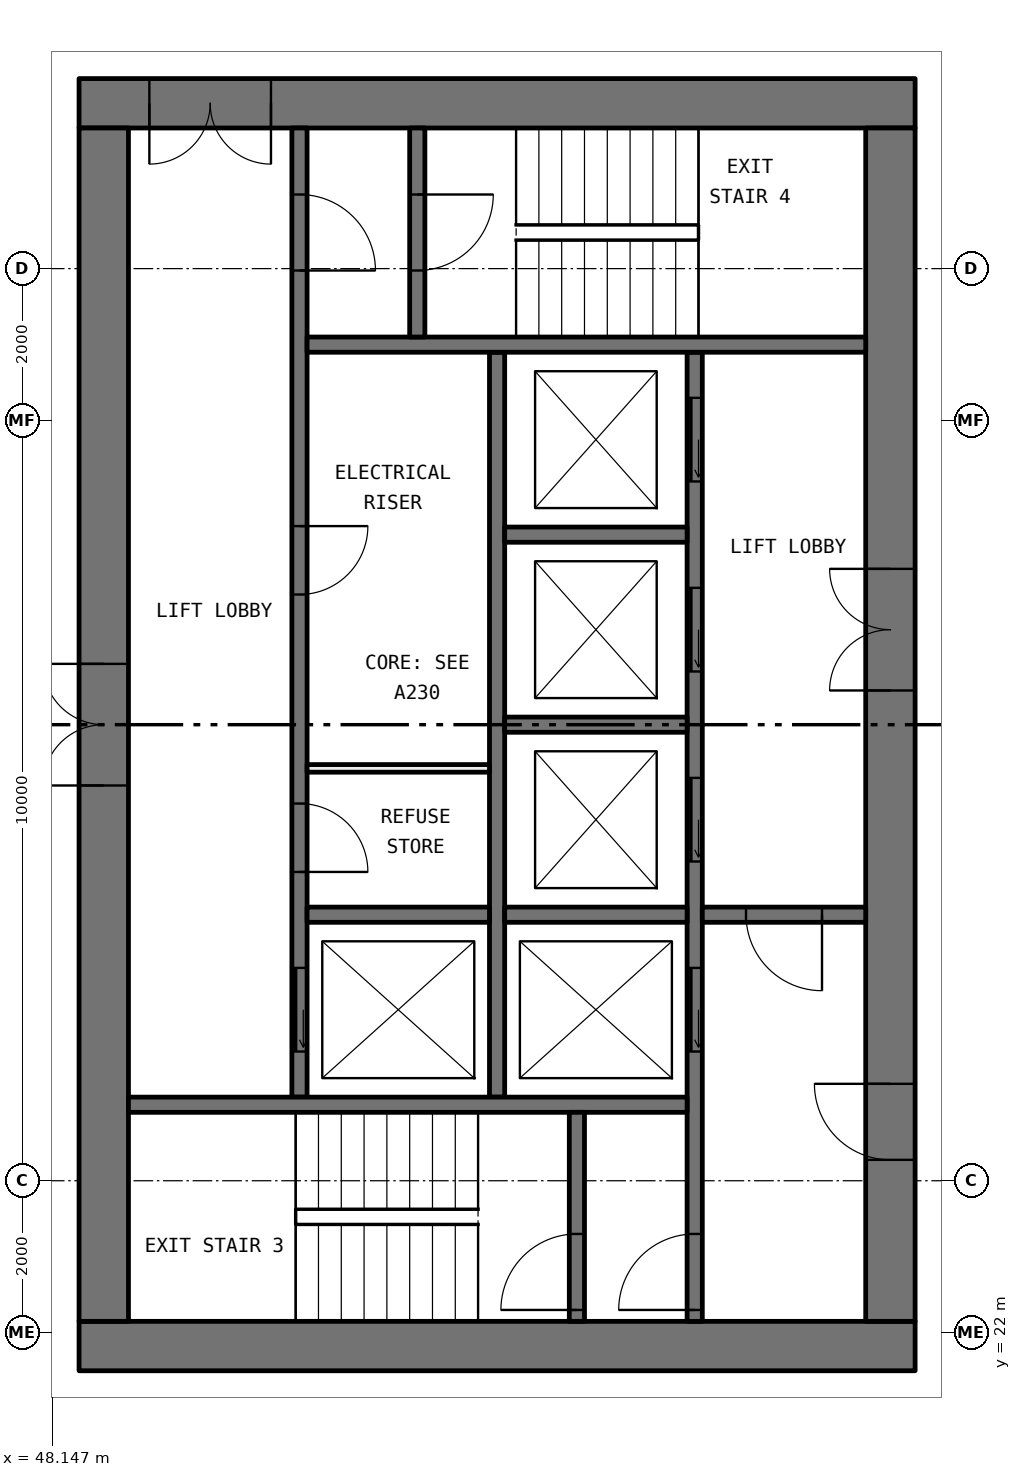
"""IFC4 building model, lengths in metres.
Left out: names, types, materials, properties, quantities, classifications, styles, units other than length and angle.
Written with IfcOpenShell. Run it as: python <this file> out.ifc"""

import sys

from ifc_helpers import new_model, si_unit, direction, frame, frame_2d, origin, place, context, subcontext, project, spatial, rectangle, extrude, element, fill, save


model = new_model("IFC4")
c1 = context("Model", 3, precision=1e-05, world=origin(), true_north=direction((0.0, 1.0)))
c2 = subcontext(c1, "Body", "Model", "MODEL_VIEW")
j1 = project(units=[si_unit("LENGTHUNIT", "METRE"), si_unit("PLANEANGLEUNIT", "RADIAN")], contexts=[c1])
p1 = place(None, origin())
s1 = spatial("IfcSite", under=j1, at=p1, CompositionType="ELEMENT")
p2 = place(p1, origin())
s2 = spatial("IfcBuilding", under=s1, at=p2, CompositionType="ELEMENT")
p3 = place(p2, frame((0.0, 0.0, 113.85)))
s3 = spatial("IfcBuildingStorey", under=s2, at=p3, CompositionType="ELEMENT", Elevation=113.85)
p4 = place(p3, frame((59.5, 21.825, 0.0), z_axis=(0.0, 0.0, 1.0), x_axis=(-1.0, 0.0, 0.0)))
e1 = element("IfcWall", 1, at=p4, inside=s3, PredefinedType="SHEAR", context=c2, shape_type="SweptSolid", body=[
    extrude(rectangle(XDim=11.0, YDim=0.65, at=frame_2d((5.5, 0.0))), origin(), (0.0, 0.0, 1.0), 3.05),
])
p5 = place(p3, frame((59.5, 38.175, 0.0), z_axis=(0.0, 0.0, 1.0), x_axis=(-1.0, 0.0, 0.0)))
e2 = element("IfcWall", 2, at=p5, inside=s3, PredefinedType="SHEAR", context=c2, shape_type="SweptSolid", body=[
    extrude(rectangle(XDim=11.0, YDim=0.65, at=frame_2d((5.5, 0.0))), origin(), (0.0, 0.0, 1.0), 3.05),
])
p6 = place(p5, frame((8.475, 0.0, 0.0)))
e3 = element("IfcOpeningElement", 3, at=p6, cuts=e2, PredefinedType="OPENING", context=c2, shape_type="SweptSolid", body=[
    extrude(rectangle(XDim=1.6, YDim=2.1, at=frame_2d((0.8, 1.05))), frame((0.0, 0.335, 0.0), z_axis=(0.0, -1.0, 0.0), x_axis=(1.0, 0.0, 0.0)), (0.0, 0.0, 1.0), 0.67),
])
p7 = place(p3, frame((59.175, 22.15, 0.0), z_axis=(0.0, 0.0, 1.0), x_axis=(0.0, 1.0, 0.0)))
e4 = element("IfcWall", 4, at=p7, inside=s3, PredefinedType="SHEAR", context=c2, shape_type="SweptSolid", body=[
    extrude(rectangle(XDim=15.7, YDim=0.65, at=frame_2d((7.85, 0.0))), origin(), (0.0, 0.0, 1.0), 3.05),
])
p8 = place(p7, frame((8.3, 0.0, 0.0)))
e5 = element("IfcOpeningElement", 5, at=p8, cuts=e4, PredefinedType="OPENING", context=c2, shape_type="SweptSolid", body=[
    extrude(rectangle(XDim=1.6, YDim=2.1, at=frame_2d((0.8, 1.05))), frame((0.0, 0.335, 0.0), z_axis=(0.0, -1.0, 0.0), x_axis=(1.0, 0.0, 0.0)), (0.0, 0.0, 1.0), 0.67),
])
p9 = place(p7, frame((2.125, 0.0, 0.0)))
e6 = element("IfcOpeningElement", 6, at=p9, cuts=e4, PredefinedType="OPENING", context=c2, shape_type="SweptSolid", body=[
    extrude(rectangle(XDim=1.0, YDim=2.1, at=frame_2d((0.5, 1.05))), frame((0.0, 0.335, 0.0), z_axis=(0.0, -1.0, 0.0), x_axis=(1.0, 0.0, 0.0)), (0.0, 0.0, 1.0), 0.67),
])
p10 = place(p3, frame((48.825, 22.15, 0.0), z_axis=(0.0, 0.0, 1.0), x_axis=(0.0, 1.0, 0.0)))
e7 = element("IfcWall", 7, at=p10, inside=s3, PredefinedType="SHEAR", context=c2, shape_type="SweptSolid", body=[
    extrude(rectangle(XDim=15.7, YDim=0.65, at=frame_2d((7.85, 0.0))), origin(), (0.0, 0.0, 1.0), 3.05),
])
p11 = place(p10, frame((7.05, 0.0, 0.0)))
e8 = element("IfcOpeningElement", 8, at=p11, cuts=e7, PredefinedType="OPENING", context=c2, shape_type="SweptSolid", body=[
    extrude(rectangle(XDim=1.6, YDim=2.1, at=frame_2d((0.8, 1.05))), frame((0.0, 0.335, 0.0), z_axis=(0.0, -1.0, 0.0), x_axis=(1.0, 0.0, 0.0)), (0.0, 0.0, 1.0), 0.67),
])
p12 = place(p3, frame((56.6, 22.15, 0.0), z_axis=(0.0, 0.0, 1.0), x_axis=(0.0, 1.0, 0.0)))
e9 = element("IfcWall", 9, at=p12, inside=s3, PredefinedType="SOLIDWALL", context=c2, shape_type="SweptSolid", body=[
    extrude(rectangle(XDim=12.75, YDim=0.2, at=frame_2d((6.375, 0.0))), origin(), (0.0, 0.0, 1.0), 3.05),
])
p13 = place(p12, frame((3.55, 0.0, 0.0)))
e10 = element("IfcOpeningElement", 10, at=p13, cuts=e9, PredefinedType="OPENING", context=c2, shape_type="SweptSolid", body=[
    extrude(rectangle(XDim=1.1, YDim=2.1, at=frame_2d((0.55, 1.05))), frame((0.0, 0.11, 0.0), z_axis=(0.0, -1.0, 0.0), x_axis=(1.0, 0.0, 0.0)), (0.0, 0.0, 1.0), 0.22),
])
p14 = place(p12, frame((6.05, 0.0, 0.0)))
e11 = element("IfcOpeningElement", 11, at=p14, cuts=e9, PredefinedType="OPENING", context=c2, shape_type="SweptSolid", body=[
    extrude(rectangle(XDim=1.1, YDim=2.1, at=frame_2d((0.55, 1.05))), frame((0.0, 0.11, 0.0), z_axis=(0.0, -1.0, 0.0), x_axis=(1.0, 0.0, 0.0)), (0.0, 0.0, 1.0), 0.22),
])
p15 = place(p12, frame((8.55, 0.0, 0.0)))
e12 = element("IfcOpeningElement", 12, at=p15, cuts=e9, PredefinedType="OPENING", context=c2, shape_type="SweptSolid", body=[
    extrude(rectangle(XDim=1.1, YDim=2.1, at=frame_2d((0.55, 1.05))), frame((0.0, 0.11, 0.0), z_axis=(0.0, -1.0, 0.0), x_axis=(1.0, 0.0, 0.0)), (0.0, 0.0, 1.0), 0.22),
])
p16 = place(p12, frame((11.05, 0.0, 0.0)))
e13 = element("IfcOpeningElement", 13, at=p16, cuts=e9, PredefinedType="OPENING", context=c2, shape_type="SweptSolid", body=[
    extrude(rectangle(XDim=1.1, YDim=2.1, at=frame_2d((0.55, 1.05))), frame((0.0, 0.11, 0.0), z_axis=(0.0, -1.0, 0.0), x_axis=(1.0, 0.0, 0.0)), (0.0, 0.0, 1.0), 0.22),
])
p17 = place(p12, frame((0.15, 0.0, 0.0)))
e14 = element("IfcOpeningElement", 14, at=p17, cuts=e9, PredefinedType="OPENING", context=c2, shape_type="SweptSolid", body=[
    extrude(rectangle(XDim=1.0, YDim=2.1, at=frame_2d((0.5, 1.05))), frame((0.0, 0.11, 0.0), z_axis=(0.0, -1.0, 0.0), x_axis=(1.0, 0.0, 0.0)), (0.0, 0.0, 1.0), 0.22),
])
p18 = place(p3, frame((51.4, 25.1, 0.0), z_axis=(0.0, 0.0, 1.0), x_axis=(0.0, 1.0, 0.0)))
e15 = element("IfcWall", 15, at=p18, inside=s3, PredefinedType="SOLIDWALL", context=c2, shape_type="SweptSolid", body=[
    extrude(rectangle(XDim=12.75, YDim=0.2, at=frame_2d((6.375, 0.0))), origin(), (0.0, 0.0, 1.0), 3.05),
])
p19 = place(p18, frame((0.6, 0.0, 0.0)))
e16 = element("IfcOpeningElement", 16, at=p19, cuts=e15, PredefinedType="OPENING", context=c2, shape_type="SweptSolid", body=[
    extrude(rectangle(XDim=1.1, YDim=2.1, at=frame_2d((0.55, 1.05))), frame((0.0, 0.11, 0.0), z_axis=(0.0, -1.0, 0.0), x_axis=(1.0, 0.0, 0.0)), (0.0, 0.0, 1.0), 0.22),
])
p20 = place(p18, frame((10.875, 0.0, 0.0)))
e17 = element("IfcOpeningElement", 17, at=p20, cuts=e15, PredefinedType="OPENING", context=c2, shape_type="SweptSolid", body=[
    extrude(rectangle(XDim=1.0, YDim=2.1, at=frame_2d((0.5, 1.05))), frame((0.0, 0.11, 0.0), z_axis=(0.0, -1.0, 0.0), x_axis=(1.0, 0.0, 0.0)), (0.0, 0.0, 1.0), 0.22),
])
p21 = place(p18, frame((2.962, 0.0, 0.0)))
e18 = element("IfcOpeningElement", 18, at=p21, cuts=e15, PredefinedType="OPENING", context=c2, shape_type="SweptSolid", body=[
    extrude(rectangle(XDim=0.9, YDim=2.1, at=frame_2d((0.45, 1.05))), frame((0.0, 0.11, 0.0), z_axis=(0.0, -1.0, 0.0), x_axis=(1.0, 0.0, 0.0)), (0.0, 0.0, 1.0), 0.22),
])
p22 = place(p18, frame((6.613, 0.0, 0.0)))
e19 = element("IfcOpeningElement", 19, at=p22, cuts=e15, PredefinedType="OPENING", context=c2, shape_type="SweptSolid", body=[
    extrude(rectangle(XDim=0.9, YDim=2.1, at=frame_2d((0.45, 1.05))), frame((0.0, 0.11, 0.0), z_axis=(0.0, -1.0, 0.0), x_axis=(1.0, 0.0, 0.0)), (0.0, 0.0, 1.0), 0.22),
])
p23 = place(p3, frame((54.0, 25.1, 0.0), z_axis=(0.0, 0.0, 1.0), x_axis=(0.0, 1.0, 0.0)))
e20 = element("IfcWall", 20, at=p23, inside=s3, PredefinedType="SOLIDWALL", context=c2, shape_type="SweptSolid", body=[
    extrude(rectangle(XDim=9.8, YDim=0.2, at=frame_2d((4.9, 0.0))), origin(), (0.0, 0.0, 1.0), 3.05),
])
for number, where, z_axis, x_axis in (
    (21, (56.5, 25.0, 0.0), (0.0, 0.0, 1.0), (-1.0, 0.0, 0.0)),
    (22, (58.85, 35.0, 0.0), (0.0, 0.0, 1.0), (-1.0, 0.0, 0.0)),
):
    element("IfcWall", number, at=place(p3, frame(where, z_axis=z_axis, x_axis=x_axis)), inside=s3, PredefinedType="SOLIDWALL", context=c2, shape_type="SweptSolid", body=[
        extrude(rectangle(XDim=7.35, YDim=0.2, at=frame_2d((3.675, 0.0))), origin(), (0.0, 0.0, 1.0), 3.05),
    ])
p24 = place(p3, frame((58.85, 27.5, 0.0), z_axis=(0.0, 0.0, 1.0), x_axis=(-1.0, 0.0, 0.0)))
e23 = element("IfcWall", 23, at=p24, inside=s3, PredefinedType="SOLIDWALL", context=c2, shape_type="SweptSolid", body=[
    extrude(rectangle(XDim=2.15, YDim=0.2, at=frame_2d((1.075, 0.0))), origin(), (0.0, 0.0, 1.0), 3.05),
])
p25 = place(p24, frame((0.575, 0.0, 0.0)))
e24 = element("IfcOpeningElement", 24, at=p25, cuts=e23, PredefinedType="OPENING", context=c2, shape_type="SweptSolid", body=[
    extrude(rectangle(XDim=1.0, YDim=2.1, at=frame_2d((0.5, 1.05))), frame((0.0, 0.11, 0.0), z_axis=(0.0, -1.0, 0.0), x_axis=(1.0, 0.0, 0.0)), (0.0, 0.0, 1.0), 0.22),
])
p26 = place(p3, frame((55.05, 22.15, 0.0), z_axis=(0.0, 0.0, 1.0), x_axis=(0.0, 1.0, 0.0)))
e25 = element("IfcWall", 25, at=p26, inside=s3, PredefinedType="SOLIDWALL", context=c2, shape_type="SweptSolid", body=[
    extrude(rectangle(XDim=2.75, YDim=0.2, at=frame_2d((1.375, 0.0))), origin(), (0.0, 0.0, 1.0), 3.05),
])
p27 = place(p26, frame((0.15, 0.0, 0.0)))
e26 = element("IfcOpeningElement", 26, at=p27, cuts=e25, PredefinedType="OPENING", context=c2, shape_type="SweptSolid", body=[
    extrude(rectangle(XDim=1.0, YDim=2.1, at=frame_2d((0.5, 1.05))), frame((0.0, 0.11, 0.0), z_axis=(0.0, -1.0, 0.0), x_axis=(1.0, 0.0, 0.0)), (0.0, 0.0, 1.0), 0.22),
])
p28 = place(p3, frame((52.95, 35.1, 0.0), z_axis=(0.0, 0.0, 1.0), x_axis=(0.0, 1.0, 0.0)))
e27 = element("IfcWall", 27, at=p28, inside=s3, PredefinedType="SOLIDWALL", context=c2, shape_type="SweptSolid", body=[
    extrude(rectangle(XDim=2.75, YDim=0.2, at=frame_2d((1.375, 0.0))), origin(), (0.0, 0.0, 1.0), 3.05),
])
p29 = place(p28, frame((0.875, 0.0, 0.0)))
e28 = element("IfcOpeningElement", 28, at=p29, cuts=e27, PredefinedType="OPENING", context=c2, shape_type="SweptSolid", body=[
    extrude(rectangle(XDim=1.0, YDim=2.1, at=frame_2d((0.5, 1.05))), frame((0.0, 0.11, 0.0), z_axis=(0.0, -1.0, 0.0), x_axis=(1.0, 0.0, 0.0)), (0.0, 0.0, 1.0), 0.22),
])
for number, where, z_axis, x_axis in (
    (29, (56.5, 27.5, 0.0), (0.0, 0.0, 1.0), (-1.0, 0.0, 0.0)),
    (30, (56.5, 30.0, 0.0), (0.0, 0.0, 1.0), (-1.0, 0.0, 0.0)),
    (31, (56.5, 32.5, 0.0), (0.0, 0.0, 1.0), (-1.0, 0.0, 0.0)),
    (32, (53.9, 27.5, 0.0), (0.0, 0.0, 1.0), (-1.0, 0.0, 0.0)),
):
    element("IfcWall", number, at=place(p3, frame(where, z_axis=z_axis, x_axis=x_axis)), inside=s3, PredefinedType="SOLIDWALL", context=c2, shape_type="SweptSolid", body=[
        extrude(rectangle(XDim=2.4, YDim=0.2, at=frame_2d((1.2, 0.0))), origin(), (0.0, 0.0, 1.0), 3.05),
    ])
p30 = place(p3, frame((53.9, 29.425, 0.0), z_axis=(0.0, 0.0, 1.0), x_axis=(-1.0, 0.0, 0.0)))
e33 = element("IfcWall", 33, at=p30, inside=s3, PredefinedType="PARTITIONING", context=c2, shape_type="SweptSolid", body=[
    extrude(rectangle(XDim=2.4, YDim=0.1, at=frame_2d((1.2, 0.0))), origin(), (0.0, 0.0, 1.0), 3.05),
])
p31 = place(p19, origin())
e34 = element("IfcDoor", 34, at=p31, inside=s3, OperationType="SLIDING_TO_LEFT", PredefinedType="DOOR", context=c2, shape_type="SweptSolid", body=[
    extrude(rectangle(XDim=1.1, YDim=2.1, at=frame_2d((0.55, 1.05))), frame((0.0, 0.025, 0.0), z_axis=(0.0, -1.0, 0.0), x_axis=(1.0, 0.0, 0.0)), (0.0, 0.0, 1.0), 0.05),
])
fill(e16, e34)
p32 = place(p13, origin())
e35 = element("IfcDoor", 35, at=p32, inside=s3, OperationType="SLIDING_TO_LEFT", PredefinedType="DOOR", context=c2, shape_type="SweptSolid", body=[
    extrude(rectangle(XDim=1.1, YDim=2.1, at=frame_2d((0.55, 1.05))), frame((0.0, 0.025, 0.0), z_axis=(0.0, -1.0, 0.0), x_axis=(1.0, 0.0, 0.0)), (0.0, 0.0, 1.0), 0.05),
])
fill(e10, e35)
p33 = place(p14, origin())
e36 = element("IfcDoor", 36, at=p33, inside=s3, OperationType="SLIDING_TO_LEFT", PredefinedType="DOOR", context=c2, shape_type="SweptSolid", body=[
    extrude(rectangle(XDim=1.1, YDim=2.1, at=frame_2d((0.55, 1.05))), frame((0.0, 0.025, 0.0), z_axis=(0.0, -1.0, 0.0), x_axis=(1.0, 0.0, 0.0)), (0.0, 0.0, 1.0), 0.05),
])
fill(e11, e36)
p34 = place(p15, origin())
e37 = element("IfcDoor", 37, at=p34, inside=s3, OperationType="SLIDING_TO_LEFT", PredefinedType="DOOR", context=c2, shape_type="SweptSolid", body=[
    extrude(rectangle(XDim=1.1, YDim=2.1, at=frame_2d((0.55, 1.05))), frame((0.0, 0.025, 0.0), z_axis=(0.0, -1.0, 0.0), x_axis=(1.0, 0.0, 0.0)), (0.0, 0.0, 1.0), 0.05),
])
fill(e12, e37)
p35 = place(p16, origin())
e38 = element("IfcDoor", 38, at=p35, inside=s3, OperationType="SLIDING_TO_LEFT", PredefinedType="DOOR", context=c2, shape_type="SweptSolid", body=[
    extrude(rectangle(XDim=1.1, YDim=2.1, at=frame_2d((0.55, 1.05))), frame((0.0, 0.025, 0.0), z_axis=(0.0, -1.0, 0.0), x_axis=(1.0, 0.0, 0.0)), (0.0, 0.0, 1.0), 0.05),
])
fill(e13, e38)
p36 = place(p27, origin())
e39 = element("IfcDoor", 39, at=p36, inside=s3, OperationType="SINGLE_SWING_RIGHT", PredefinedType="DOOR", context=c2, shape_type="SweptSolid", body=[
    extrude(rectangle(XDim=1.0, YDim=2.1, at=frame_2d((0.5, 1.05))), frame((0.0, 0.025, 0.0), z_axis=(0.0, -1.0, 0.0), x_axis=(1.0, 0.0, 0.0)), (0.0, 0.0, 1.0), 0.05),
])
fill(e26, e39)
p37 = place(p17, origin())
e40 = element("IfcDoor", 40, at=p37, inside=s3, OperationType="SINGLE_SWING_RIGHT", PredefinedType="DOOR", context=c2, shape_type="SweptSolid", body=[
    extrude(rectangle(XDim=1.0, YDim=2.1, at=frame_2d((0.5, 1.05))), frame((0.0, 0.025, 0.0), z_axis=(0.0, -1.0, 0.0), x_axis=(1.0, 0.0, 0.0)), (0.0, 0.0, 1.0), 0.05),
])
fill(e14, e40)
p38 = place(p20, frame((1.0, 0.0, 0.0), x_axis=(-1.0, 0.0, 0.0)))
e41 = element("IfcDoor", 41, at=p38, inside=s3, OperationType="SINGLE_SWING_LEFT", PredefinedType="DOOR", context=c2, shape_type="SweptSolid", body=[
    extrude(rectangle(XDim=1.0, YDim=2.1, at=frame_2d((0.5, 1.05))), frame((0.0, 0.025, 0.0), z_axis=(0.0, -1.0, 0.0), x_axis=(1.0, 0.0, 0.0)), (0.0, 0.0, 1.0), 0.05),
])
fill(e17, e41)
p39 = place(p29, frame((1.0, 0.0, 0.0), x_axis=(-1.0, 0.0, 0.0)))
e42 = element("IfcDoor", 42, at=p39, inside=s3, OperationType="SINGLE_SWING_RIGHT", PredefinedType="DOOR", context=c2, shape_type="SweptSolid", body=[
    extrude(rectangle(XDim=1.0, YDim=2.1, at=frame_2d((0.5, 1.05))), frame((0.0, 0.025, 0.0), z_axis=(0.0, -1.0, 0.0), x_axis=(1.0, 0.0, 0.0)), (0.0, 0.0, 1.0), 0.05),
])
fill(e28, e42)
p40 = place(p25, origin())
e43 = element("IfcDoor", 43, at=p40, inside=s3, OperationType="SINGLE_SWING_RIGHT", PredefinedType="DOOR", context=c2, shape_type="SweptSolid", body=[
    extrude(rectangle(XDim=1.0, YDim=2.1, at=frame_2d((0.5, 1.05))), frame((0.0, 0.025, 0.0), z_axis=(0.0, -1.0, 0.0), x_axis=(1.0, 0.0, 0.0)), (0.0, 0.0, 1.0), 0.05),
])
fill(e24, e43)
p41 = place(p8, origin())
e44 = element("IfcDoor", 44, at=p41, inside=s3, OperationType="DOUBLE_DOOR_SINGLE_SWING", PredefinedType="DOOR", context=c2, shape_type="SweptSolid", body=[
    extrude(rectangle(XDim=1.6, YDim=2.1, at=frame_2d((0.8, 1.05))), frame((0.0, 0.025, 0.0), z_axis=(0.0, -1.0, 0.0), x_axis=(1.0, 0.0, 0.0)), (0.0, 0.0, 1.0), 0.05),
])
fill(e5, e44)
p42 = place(p9, origin())
e45 = element("IfcDoor", 45, at=p42, inside=s3, OperationType="SINGLE_SWING_LEFT", PredefinedType="DOOR", context=c2, shape_type="SweptSolid", body=[
    extrude(rectangle(XDim=1.0, YDim=2.1, at=frame_2d((0.5, 1.05))), frame((0.0, 0.025, 0.0), z_axis=(0.0, -1.0, 0.0), x_axis=(1.0, 0.0, 0.0)), (0.0, 0.0, 1.0), 0.05),
])
fill(e6, e45)
p43 = place(p6, origin())
e46 = element("IfcDoor", 46, at=p43, inside=s3, OperationType="DOUBLE_DOOR_SINGLE_SWING", PredefinedType="DOOR", context=c2, shape_type="SweptSolid", body=[
    extrude(rectangle(XDim=1.6, YDim=2.1, at=frame_2d((0.8, 1.05))), frame((0.0, 0.025, 0.0), z_axis=(0.0, -1.0, 0.0), x_axis=(1.0, 0.0, 0.0)), (0.0, 0.0, 1.0), 0.05),
])
fill(e3, e46)
p44 = place(p11, origin())
e47 = element("IfcDoor", 47, at=p44, inside=s3, OperationType="DOUBLE_DOOR_SINGLE_SWING", PredefinedType="DOOR", context=c2, shape_type="SweptSolid", body=[
    extrude(rectangle(XDim=1.6, YDim=2.1, at=frame_2d((0.8, 1.05))), frame((0.0, 0.025, 0.0), z_axis=(0.0, -1.0, 0.0), x_axis=(1.0, 0.0, 0.0)), (0.0, 0.0, 1.0), 0.05),
])
fill(e8, e47)
p45 = place(p21, frame((0.9, 0.0, 0.0), x_axis=(-1.0, 0.0, 0.0)))
e48 = element("IfcDoor", 48, at=p45, inside=s3, OperationType="SINGLE_SWING_LEFT", PredefinedType="DOOR", context=c2, shape_type="SweptSolid", body=[
    extrude(rectangle(XDim=0.9, YDim=2.1, at=frame_2d((0.45, 1.05))), frame((0.0, 0.025, 0.0), z_axis=(0.0, -1.0, 0.0), x_axis=(1.0, 0.0, 0.0)), (0.0, 0.0, 1.0), 0.05),
])
fill(e18, e48)
p46 = place(p22, frame((0.9, 0.0, 0.0), x_axis=(-1.0, 0.0, 0.0)))
e49 = element("IfcDoor", 49, at=p46, inside=s3, OperationType="SINGLE_SWING_RIGHT", PredefinedType="DOOR", context=c2, shape_type="SweptSolid", body=[
    extrude(rectangle(XDim=0.9, YDim=2.1, at=frame_2d((0.45, 1.05))), frame((0.0, 0.025, 0.0), z_axis=(0.0, -1.0, 0.0), x_axis=(1.0, 0.0, 0.0)), (0.0, 0.0, 1.0), 0.05),
])
fill(e19, e49)
save(model, sys.argv[1])
